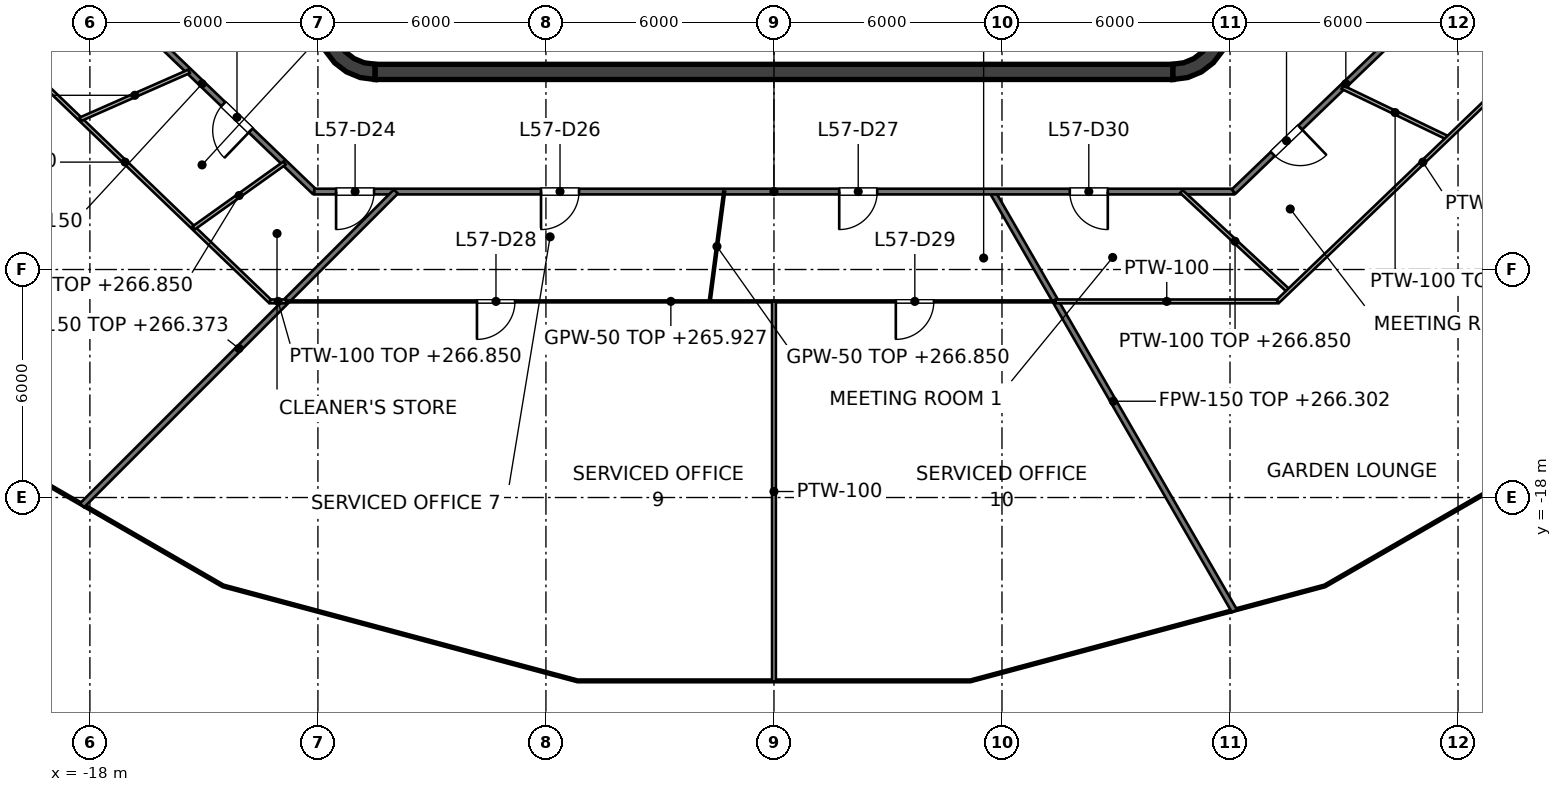
"""IFC4 building model, lengths in metres.
Left out: names, types, materials, properties, quantities, classifications, styles, units other than length and angle.
Written with IfcOpenShell. Run it as: python <this file> out.ifc"""

import sys

from ifc_helpers import new_model, si_unit, direction, frame, frame_2d, origin, place, context, subcontext, project, spatial, polyline, rectangle, outline, extrude, element, fill, save


model = new_model("IFC4")
c1 = context("Model", 3, precision=1e-05, world=origin(), true_north=direction((0.0, 1.0)))
c2 = subcontext(c1, "Body", "Model", "MODEL_VIEW")
j1 = project(units=[si_unit("LENGTHUNIT", "METRE"), si_unit("PLANEANGLEUNIT", "RADIAN")], contexts=[c1])
p1 = place(None, origin())
s1 = spatial("IfcSite", under=j1, at=p1, CompositionType="ELEMENT")
p2 = place(p1, origin())
s2 = spatial("IfcBuilding", under=s1, at=p2, CompositionType="ELEMENT")
p3 = place(p2, frame((0.0, 0.0, 263.0)))
s3 = spatial("IfcBuildingStorey", under=s2, at=p3, CompositionType="ELEMENT", Elevation=263.0)
p4 = place(p3, frame((-10.5, -6.8, 0.0), z_axis=(0.0, 0.0, 1.0), x_axis=(1.0, 0.0, 0.0)))
e1 = element("IfcWall", 1, at=p4, inside=s3, PredefinedType="SHEAR", context=c2, shape_type="SweptSolid", body=[
    extrude(rectangle(XDim=21.0, YDim=0.4, at=frame_2d((10.5, 0.0))), origin(), (0.0, 0.0, 1.0), 4.0),
])
p5 = place(p3, origin())
e2 = element("IfcWall", 2, at=p5, inside=s3, PredefinedType="SHEAR", context=c2, shape_type="SweptSolid", body=[
    extrude(outline(polyline([(-10.5, -7.0), (-10.5, -6.596), (-10.784, -6.559), (-11.048, -6.45), (-11.275, -6.275), (-11.45, -6.048), (-11.559, -5.784), (-11.596, -5.5), (-12.0, -5.5), (-11.949, -5.888), (-11.799, -6.25), (-11.561, -6.561), (-11.25, -6.799), (-10.888, -6.949), (-10.5, -7.0)])), origin(), (0.0, 0.0, 1.0), 4.0),
])
e3 = element("IfcWall", 3, at=p5, inside=s3, PredefinedType="SHEAR", context=c2, shape_type="SweptSolid", body=[
    extrude(outline(polyline([(12.0, -5.5), (11.596, -5.5), (11.559, -5.784), (11.45, -6.048), (11.275, -6.275), (11.048, -6.45), (10.784, -6.559), (10.5, -6.596), (10.5, -7.0), (10.888, -6.949), (11.25, -6.799), (11.561, -6.561), (11.799, -6.25), (11.949, -5.888), (12.0, -5.5)])), origin(), (0.0, 0.0, 1.0), 4.0),
])
p6 = place(p3, frame((1.5, -6.6, 0.0), z_axis=(0.0, 0.0, 1.0), x_axis=(0.0, 1.0, 0.0)))
e4 = element("IfcWall", 4, at=p6, inside=s3, PredefinedType="PARTITIONING", context=c2, shape_type="SweptSolid", body=[
    extrude(rectangle(XDim=2.5, YDim=0.15, at=frame_2d((1.25, 0.0))), origin(), (0.0, 0.0, 1.0), 3.85),
])
p7 = place(p6, frame((0.8, 0.0, 0.0)))
e5 = element("IfcOpeningElement", 5, at=p7, cuts=e4, PredefinedType="OPENING", context=c2, shape_type="SweptSolid", body=[
    extrude(rectangle(XDim=0.9, YDim=2.1, at=frame_2d((0.45, 1.05))), frame((0.0, 0.075, 0.0), z_axis=(0.0, -1.0, 0.0), x_axis=(1.0, 0.0, 0.0)), (0.0, 0.0, 1.0), 0.15),
])
p8 = place(p3, frame((9.0, -6.6, 0.0), z_axis=(0.0, 0.0, 1.0), x_axis=(0.0, 1.0, 0.0)))
e6 = element("IfcWall", 6, at=p8, inside=s3, PredefinedType="SOLIDWALL", context=c2, shape_type="SweptSolid", body=[
    extrude(rectangle(XDim=2.5, YDim=0.25, at=frame_2d((1.25, 0.0))), origin(), (0.0, 0.0, 1.0), 3.85),
])
p9 = place(p8, frame((0.65, 0.0, 0.0)))
e7 = element("IfcOpeningElement", 7, at=p9, cuts=e6, PredefinedType="OPENING", context=c2, shape_type="SweptSolid", body=[
    extrude(rectangle(XDim=1.2, YDim=2.1, at=frame_2d((0.6, 1.05))), frame((0.0, 0.125, 0.0), z_axis=(0.0, -1.0, 0.0), x_axis=(1.0, 0.0, 0.0)), (0.0, 0.0, 1.0), 0.25),
])
p10 = place(p3, frame((-9.0, -6.6, 0.0), z_axis=(0.0, 0.0, 1.0), x_axis=(0.0, 1.0, 0.0)))
e8 = element("IfcWall", 8, at=p10, inside=s3, PredefinedType="PARTITIONING", context=c2, shape_type="SweptSolid", body=[
    extrude(rectangle(XDim=2.5, YDim=0.25, at=frame_2d((1.25, 0.0))), origin(), (0.0, 0.0, 1.0), 3.85),
])
p11 = place(p10, frame((0.75, 0.0, 0.0)))
e9 = element("IfcOpeningElement", 9, at=p11, cuts=e8, PredefinedType="OPENING", context=c2, shape_type="SweptSolid", body=[
    extrude(rectangle(XDim=1.0, YDim=2.1, at=frame_2d((0.5, 1.05))), frame((0.0, 0.125, 0.0), z_axis=(0.0, -1.0, 0.0), x_axis=(1.0, 0.0, 0.0)), (0.0, 0.0, 1.0), 0.25),
])
p12 = place(p3, frame((3.15, -6.6, 0.0), z_axis=(0.0, 0.0, 1.0), x_axis=(0.0, 1.0, 0.0)))
e10 = element("IfcWall", 10, at=p12, inside=s3, PredefinedType="SOLIDWALL", context=c2, shape_type="SweptSolid", body=[
    extrude(rectangle(XDim=2.5, YDim=0.25, at=frame_2d((1.25, 0.0))), origin(), (0.0, 0.0, 1.0), 3.85),
])
p13 = place(p3, frame((-2.9, -6.6, 0.0), z_axis=(0.0, 0.0, 1.0), x_axis=(0.0, 1.0, 0.0)))
e11 = element("IfcWall", 11, at=p13, inside=s3, PredefinedType="PARTITIONING", context=c2, shape_type="SweptSolid", body=[
    extrude(rectangle(XDim=2.5, YDim=0.25, at=frame_2d((1.25, 0.0))), origin(), (0.0, 0.0, 1.0), 3.85),
])
p14 = place(p13, frame((0.8, 0.0, 0.0)))
e12 = element("IfcOpeningElement", 12, at=p14, cuts=e11, PredefinedType="OPENING", context=c2, shape_type="SweptSolid", body=[
    extrude(rectangle(XDim=0.9, YDim=2.1, at=frame_2d((0.45, 1.05))), frame((0.0, 0.125, 0.0), z_axis=(0.0, -1.0, 0.0), x_axis=(1.0, 0.0, 0.0)), (0.0, 0.0, 1.0), 0.25),
])
p15 = place(p3, frame((5.744, -9.949, 0.0), z_axis=(0.0, 0.0, 1.0), x_axis=(0.500041996576, -0.866001155692, 0.0)))
e13 = element("IfcWall", 13, at=p15, inside=s3, PredefinedType="PARTITIONING", context=c2, shape_type="SweptSolid", body=[
    extrude(rectangle(XDim=12.742, YDim=0.15, at=frame_2d((6.371, 0.0))), origin(), (0.0, 0.0, 1.0), 3.302),
])
p16 = place(p3, frame((-18.0, -4.278, 0.0), z_axis=(0.0, 0.0, 1.0), x_axis=(0.721290181137, -0.692633001376, 0.0)))
e14 = element("IfcWall", 14, at=p16, inside=s3, PredefinedType="PARTITIONING", context=c2, shape_type="SweptSolid", body=[
    extrude(rectangle(XDim=8.187, YDim=0.15, at=frame_2d((4.094, 0.0))), origin(), (0.0, 0.0, 1.0), 2.918),
])
p17 = place(p16, frame((4.866, 0.0, 0.0)))
e15 = element("IfcOpeningElement", 15, at=p17, cuts=e14, PredefinedType="OPENING", context=c2, shape_type="SweptSolid", body=[
    extrude(rectangle(XDim=1.0, YDim=2.1, at=frame_2d((0.5, 1.05))), frame((0.0, 0.075, 0.0), z_axis=(0.0, -1.0, 0.0), x_axis=(1.0, 0.0, 0.0)), (0.0, 0.0, 1.0), 0.15),
])
p18 = place(p3, frame((-12.095, -9.949, 0.0), z_axis=(0.0, 0.0, 1.0), x_axis=(1.0, 0.0, 0.0)))
e16 = element("IfcWall", 16, at=p18, inside=s3, PredefinedType="PARTITIONING", context=c2, shape_type="SweptSolid", body=[
    extrude(rectangle(XDim=24.19, YDim=0.15, at=frame_2d((12.095, 0.0))), origin(), (0.0, 0.0, 1.0), 2.927),
])
p19 = place(p18, frame((0.573, 0.0, 0.0)))
e17 = element("IfcOpeningElement", 17, at=p19, cuts=e16, PredefinedType="OPENING", context=c2, shape_type="SweptSolid", body=[
    extrude(rectangle(XDim=1.0, YDim=2.1, at=frame_2d((0.5, 1.05))), frame((0.0, 0.075, 0.0), z_axis=(0.0, -1.0, 0.0), x_axis=(1.0, 0.0, 0.0)), (0.0, 0.0, 1.0), 0.15),
])
p20 = place(p18, frame((5.966, 0.0, 0.0)))
e18 = element("IfcOpeningElement", 18, at=p20, cuts=e16, PredefinedType="OPENING", context=c2, shape_type="SweptSolid", body=[
    extrude(rectangle(XDim=1.0, YDim=2.1, at=frame_2d((0.5, 1.05))), frame((0.0, 0.075, 0.0), z_axis=(0.0, -1.0, 0.0), x_axis=(1.0, 0.0, 0.0)), (0.0, 0.0, 1.0), 0.15),
])
p21 = place(p18, frame((13.812, 0.0, 0.0)))
e19 = element("IfcOpeningElement", 19, at=p21, cuts=e16, PredefinedType="OPENING", context=c2, shape_type="SweptSolid", body=[
    extrude(rectangle(XDim=1.0, YDim=2.1, at=frame_2d((0.5, 1.05))), frame((0.0, 0.075, 0.0), z_axis=(0.0, -1.0, 0.0), x_axis=(1.0, 0.0, 0.0)), (0.0, 0.0, 1.0), 0.15),
])
p22 = place(p18, frame((19.879, 0.0, 0.0)))
e20 = element("IfcOpeningElement", 20, at=p22, cuts=e16, PredefinedType="OPENING", context=c2, shape_type="SweptSolid", body=[
    extrude(rectangle(XDim=1.0, YDim=2.1, at=frame_2d((0.5, 1.05))), frame((0.0, 0.075, 0.0), z_axis=(0.0, -1.0, 0.0), x_axis=(1.0, 0.0, 0.0)), (0.0, 0.0, 1.0), 0.15),
])
p23 = place(p3, frame((12.095, -9.949, 0.0), z_axis=(0.0, 0.0, 1.0), x_axis=(0.721260976692, 0.69266341285, 0.0)))
e21 = element("IfcWall", 21, at=p23, inside=s3, PredefinedType="PARTITIONING", context=c2, shape_type="SweptSolid", body=[
    extrude(rectangle(XDim=8.187, YDim=0.15, at=frame_2d((4.094, 0.0))), origin(), (0.0, 0.0, 1.0), 2.918),
])
p24 = place(p23, frame((1.43, 0.0, 0.0)))
e22 = element("IfcOpeningElement", 22, at=p24, cuts=e21, PredefinedType="OPENING", context=c2, shape_type="SweptSolid", body=[
    extrude(rectangle(XDim=1.0, YDim=2.1, at=frame_2d((0.5, 1.05))), frame((0.0, 0.075, 0.0), z_axis=(0.0, -1.0, 0.0), x_axis=(1.0, 0.0, 0.0)), (0.0, 0.0, 1.0), 0.15),
])
p25 = place(p3, frame((-18.206, -18.206, 0.0), z_axis=(0.0, 0.0, 1.0), x_axis=(0.707106781187, 0.707106781187, 0.0)))
e23 = element("IfcWall", 23, at=p25, inside=s3, PredefinedType="PARTITIONING", context=c2, shape_type="SweptSolid", body=[
    extrude(rectangle(XDim=11.677, YDim=0.15, at=frame_2d((5.839, 0.0))), origin(), (0.0, 0.0, 1.0), 3.373),
])
p26 = place(p3, frame((-12.839, -12.839, 0.0), z_axis=(0.0, 0.0, 1.0), x_axis=(1.0, 0.0, 0.0)))
e24 = element("IfcWall", 24, at=p26, inside=s3, PredefinedType="PARTITIONING", context=c2, shape_type="SweptSolid", body=[
    extrude(rectangle(XDim=20.252, YDim=0.05, at=frame_2d((10.126, 0.0))), origin(), (0.0, 0.0, 1.0), 2.927),
])
p27 = place(p26, frame((5.024, 0.0, 0.0)))
e25 = element("IfcOpeningElement", 25, at=p27, cuts=e24, PredefinedType="OPENING", context=c2, shape_type="SweptSolid", body=[
    extrude(rectangle(XDim=1.0, YDim=2.1, at=frame_2d((0.5, 1.05))), frame((0.0, 0.025, 0.0), z_axis=(0.0, -1.0, 0.0), x_axis=(1.0, 0.0, 0.0)), (0.0, 0.0, 1.0), 0.05),
])
p28 = place(p26, frame((16.045, 0.0, 0.0)))
e26 = element("IfcOpeningElement", 26, at=p28, cuts=e24, PredefinedType="OPENING", context=c2, shape_type="SweptSolid", body=[
    extrude(rectangle(XDim=1.0, YDim=2.1, at=frame_2d((0.5, 1.05))), frame((0.0, 0.025, 0.0), z_axis=(0.0, -1.0, 0.0), x_axis=(1.0, 0.0, 0.0)), (0.0, 0.0, 1.0), 0.05),
])
p29 = place(p3, frame((-1.69, -12.839, 0.0), z_axis=(0.0, 0.0, 1.0), x_axis=(0.130320186763, 0.991471960734, 0.0)))
e27 = element("IfcWall", 27, at=p29, inside=s3, PredefinedType="PARTITIONING", context=c2, shape_type="SweptSolid", body=[
    extrude(rectangle(XDim=2.915, YDim=0.05, at=frame_2d((1.458, 0.0))), origin(), (0.0, 0.0, 1.0), 3.85),
])
p30 = place(p3, frame((-20.89, -5.509, 0.0), z_axis=(0.0, 0.0, 1.0), x_axis=(0.721243919182, -0.692681174166, 0.0)))
e28 = element("IfcWall", 28, at=p30, inside=s3, PredefinedType="PARTITIONING", context=c2, shape_type="SweptSolid", body=[
    extrude(rectangle(XDim=10.582, YDim=0.1, at=frame_2d((5.291, 0.0))), origin(), (0.0, 0.0, 1.0), 2.927),
])
p31 = place(p3, frame((10.722, -9.949, 0.0), z_axis=(0.0, 0.0, 1.0), x_axis=(0.733130105592, -0.680088412102, 0.0)))
e29 = element("IfcWall", 29, at=p31, inside=s3, PredefinedType="PARTITIONING", context=c2, shape_type="SweptSolid", body=[
    extrude(rectangle(XDim=3.848, YDim=0.1, at=frame_2d((1.924, 0.0))), origin(), (0.0, 0.0, 1.0), 3.85),
])
p32 = place(p3, frame((14.955, -7.202, 0.0), z_axis=(0.0, 0.0, 1.0), x_axis=(0.900977603602, -0.433865598783, 0.0)))
e30 = element("IfcWall", 30, at=p32, inside=s3, PredefinedType="PARTITIONING", context=c2, shape_type="SweptSolid", body=[
    extrude(rectangle(XDim=3.084, YDim=0.1, at=frame_2d((1.542, 0.0))), origin(), (0.0, 0.0, 1.0), 3.85),
])
p33 = place(p3, frame((-13.258, -12.839, 0.0), z_axis=(0.0, 0.0, 1.0), x_axis=(1.0, 0.0, 0.0)))
e31 = element("IfcWall", 31, at=p33, inside=s3, PredefinedType="PARTITIONING", context=c2, shape_type="SweptSolid", body=[
    extrude(rectangle(XDim=0.419, YDim=0.1, at=frame_2d((0.209, 0.0))), origin(), (0.0, 0.0, 1.0), 3.85),
])
p34 = place(p3, frame((7.413, -12.839, 0.0), z_axis=(0.0, 0.0, 1.0), x_axis=(1.0, 0.0, 0.0)))
e32 = element("IfcWall", 32, at=p34, inside=s3, PredefinedType="PARTITIONING", context=c2, shape_type="SweptSolid", body=[
    extrude(rectangle(XDim=5.845, YDim=0.1, at=frame_2d((2.922, 0.0))), origin(), (0.0, 0.0, 1.0), 2.927),
])
p35 = place(p3, frame((-18.249, -8.046, 0.0), z_axis=(0.0, 0.0, 1.0), x_axis=(0.915015337029, 0.403419053841, 0.0)))
e33 = element("IfcWall", 33, at=p35, inside=s3, PredefinedType="PARTITIONING", context=c2, shape_type="SweptSolid", body=[
    extrude(rectangle(XDim=3.126, YDim=0.1, at=frame_2d((1.563, 0.0))), origin(), (0.0, 0.0, 1.0), 2.995),
])
p36 = place(p3, frame((-15.27, -10.907, 0.0), z_axis=(0.0, 0.0, 1.0), x_axis=(0.813789563909, 0.581159655923, 0.0)))
e34 = element("IfcWall", 34, at=p36, inside=s3, PredefinedType="PARTITIONING", context=c2, shape_type="SweptSolid", body=[
    extrude(rectangle(XDim=2.941, YDim=0.1, at=frame_2d((1.47, 0.0))), origin(), (0.0, 0.0, 1.0), 3.85),
])
p37 = place(p3, frame((13.258, -12.839, 0.0), z_axis=(0.0, 0.0, 1.0), x_axis=(0.721435728401, 0.692481400318, 0.0)))
e35 = element("IfcWall", 35, at=p37, inside=s3, PredefinedType="PARTITIONING", context=c2, shape_type="SweptSolid", body=[
    extrude(rectangle(XDim=10.582, YDim=0.1, at=frame_2d((5.291, 0.0))), origin(), (0.0, 0.0, 1.0), 2.927),
])
p38 = place(p3, frame((0.0, -22.845, 0.0), z_axis=(0.0, 0.0, 1.0), x_axis=(0.0, 1.0, 0.0)))
e36 = element("IfcWall", 36, at=p38, inside=s3, PredefinedType="PARTITIONING", context=c2, shape_type="SweptSolid", body=[
    extrude(rectangle(XDim=10.006, YDim=0.1, at=frame_2d((5.003, 0.0))), origin(), (0.0, 0.0, 1.0), 2.927),
])
p39 = place(p17, origin())
e37 = element("IfcDoor", 37, at=p39, inside=s3, OperationType="SINGLE_SWING_RIGHT", PredefinedType="DOOR", context=c2, shape_type="SweptSolid", body=[
    extrude(rectangle(XDim=1.0, YDim=2.1, at=frame_2d((0.5, 1.05))), frame((0.0, 0.025, 0.0), z_axis=(0.0, -1.0, 0.0), x_axis=(1.0, 0.0, 0.0)), (0.0, 0.0, 1.0), 0.05),
])
fill(e15, e37)
p40 = place(p19, origin())
e38 = element("IfcDoor", 38, at=p40, inside=s3, OperationType="SINGLE_SWING_LEFT", PredefinedType="DOOR", context=c2, shape_type="SweptSolid", body=[
    extrude(rectangle(XDim=1.0, YDim=2.1, at=frame_2d((0.5, 1.05))), frame((0.0, 0.025, 0.0), z_axis=(0.0, -1.0, 0.0), x_axis=(1.0, 0.0, 0.0)), (0.0, 0.0, 1.0), 0.05),
])
fill(e17, e38)
p41 = place(p20, origin())
e39 = element("IfcDoor", 39, at=p41, inside=s3, OperationType="SINGLE_SWING_LEFT", PredefinedType="DOOR", context=c2, shape_type="SweptSolid", body=[
    extrude(rectangle(XDim=1.0, YDim=2.1, at=frame_2d((0.5, 1.05))), frame((0.0, 0.025, 0.0), z_axis=(0.0, -1.0, 0.0), x_axis=(1.0, 0.0, 0.0)), (0.0, 0.0, 1.0), 0.05),
])
fill(e18, e39)
p42 = place(p21, origin())
e40 = element("IfcDoor", 40, at=p42, inside=s3, OperationType="SINGLE_SWING_LEFT", PredefinedType="DOOR", context=c2, shape_type="SweptSolid", body=[
    extrude(rectangle(XDim=1.0, YDim=2.1, at=frame_2d((0.5, 1.05))), frame((0.0, 0.025, 0.0), z_axis=(0.0, -1.0, 0.0), x_axis=(1.0, 0.0, 0.0)), (0.0, 0.0, 1.0), 0.05),
])
fill(e19, e40)
p43 = place(p27, origin())
e41 = element("IfcDoor", 41, at=p43, inside=s3, OperationType="SINGLE_SWING_LEFT", PredefinedType="DOOR", context=c2, shape_type="SweptSolid", body=[
    extrude(rectangle(XDim=1.0, YDim=2.1, at=frame_2d((0.5, 1.05))), frame((0.0, 0.025, 0.0), z_axis=(0.0, -1.0, 0.0), x_axis=(1.0, 0.0, 0.0)), (0.0, 0.0, 1.0), 0.05),
])
fill(e25, e41)
p44 = place(p28, origin())
e42 = element("IfcDoor", 42, at=p44, inside=s3, OperationType="SINGLE_SWING_LEFT", PredefinedType="DOOR", context=c2, shape_type="SweptSolid", body=[
    extrude(rectangle(XDim=1.0, YDim=2.1, at=frame_2d((0.5, 1.05))), frame((0.0, 0.025, 0.0), z_axis=(0.0, -1.0, 0.0), x_axis=(1.0, 0.0, 0.0)), (0.0, 0.0, 1.0), 0.05),
])
fill(e26, e42)
p45 = place(p22, origin())
e43 = element("IfcDoor", 43, at=p45, inside=s3, OperationType="SINGLE_SWING_RIGHT", PredefinedType="DOOR", context=c2, shape_type="SweptSolid", body=[
    extrude(rectangle(XDim=1.0, YDim=2.1, at=frame_2d((0.5, 1.05))), frame((0.0, 0.025, 0.0), z_axis=(0.0, -1.0, 0.0), x_axis=(1.0, 0.0, 0.0)), (0.0, 0.0, 1.0), 0.05),
])
fill(e20, e43)
p46 = place(p24, origin())
e44 = element("IfcDoor", 44, at=p46, inside=s3, OperationType="SINGLE_SWING_RIGHT", PredefinedType="DOOR", context=c2, shape_type="SweptSolid", body=[
    extrude(rectangle(XDim=1.0, YDim=2.1, at=frame_2d((0.5, 1.05))), frame((0.0, 0.025, 0.0), z_axis=(0.0, -1.0, 0.0), x_axis=(1.0, 0.0, 0.0)), (0.0, 0.0, 1.0), 0.05),
])
fill(e22, e44)
save(model, sys.argv[1])
